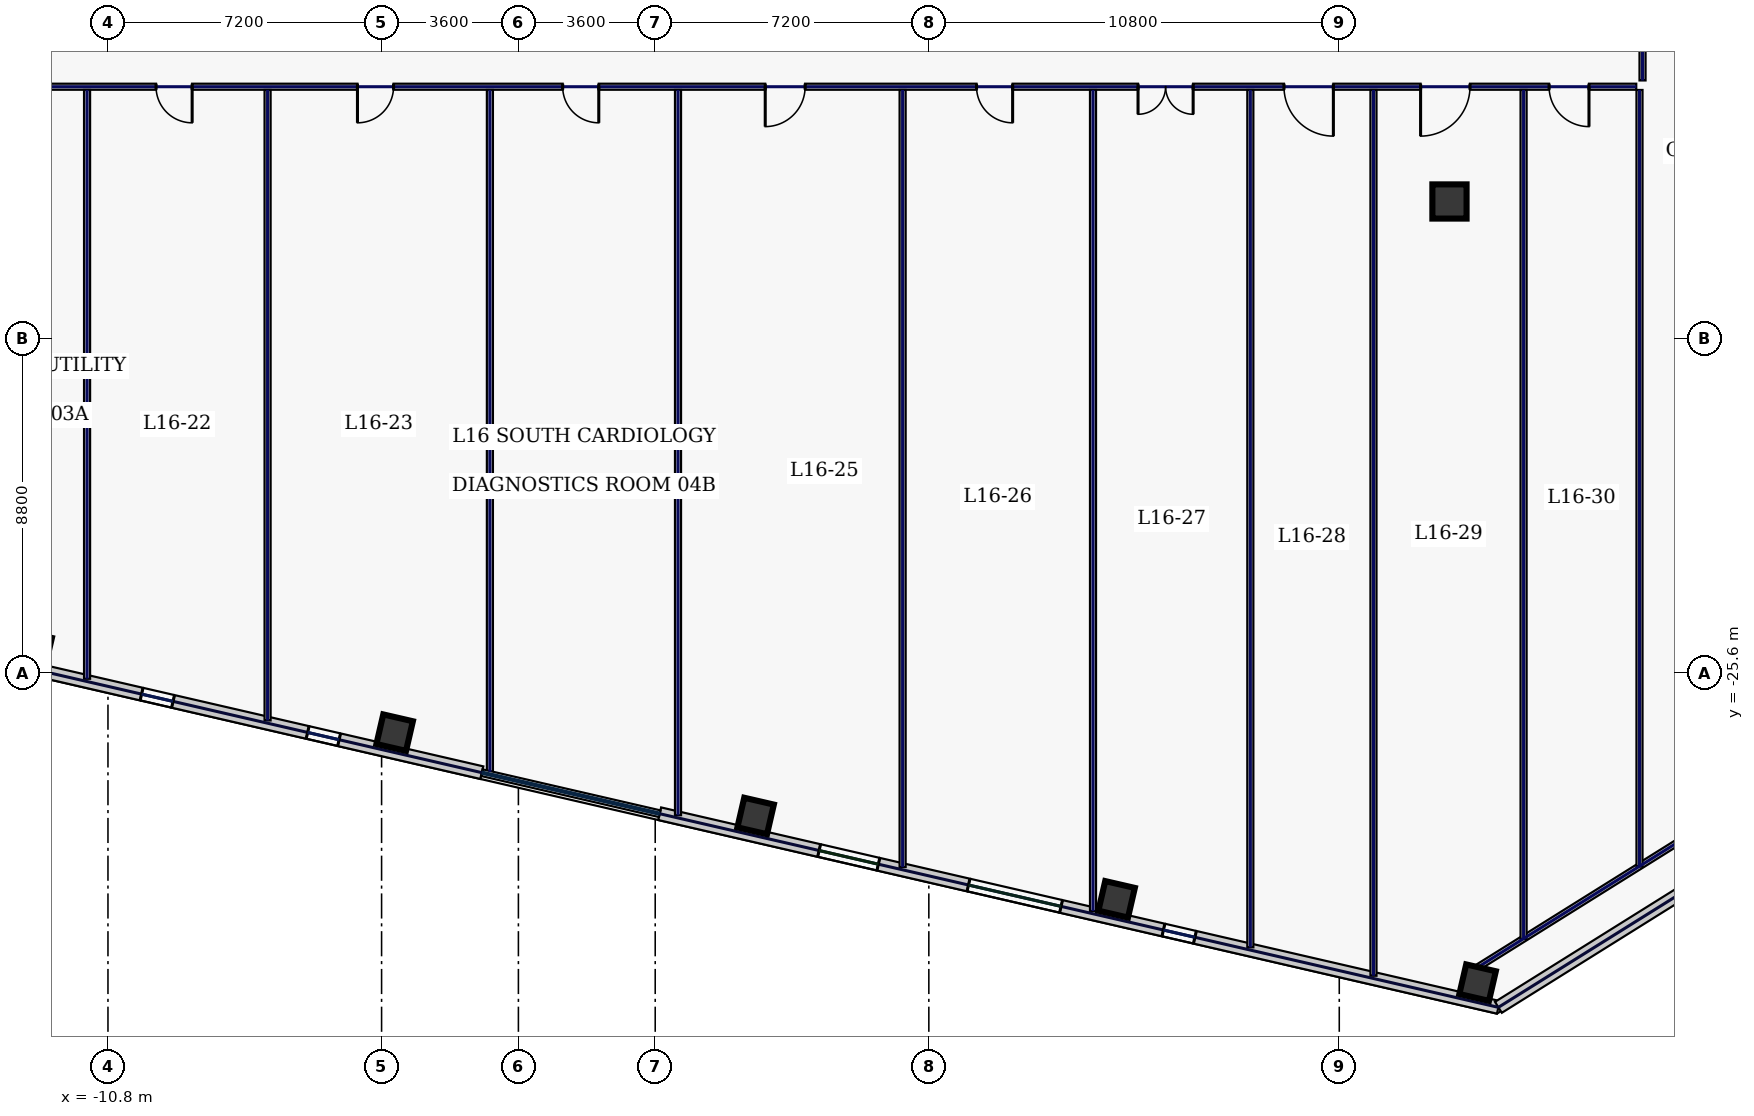
"""IFC4 building model, lengths in metres.
Left out: names, types, materials, properties, quantities, classifications, styles, units other than length and angle.
Written with IfcOpenShell. Run it as: python <this file> out.ifc"""

import sys

from ifc_helpers import new_model, si_unit, direction, frame, frame_2d, origin, origin_2d, place, context, subcontext, project, spatial, rectangle, hollow_rectangle, extrude, element, fill, save


model = new_model("IFC4")
c1 = context("Model", 3, precision=1e-05, world=origin(), true_north=direction((0.0, 1.0)))
c2 = subcontext(c1, "Body", "Model", "MODEL_VIEW")
j1 = project(units=[si_unit("LENGTHUNIT", "METRE"), si_unit("PLANEANGLEUNIT", "RADIAN")], contexts=[c1])
p1 = place(None, origin())
s1 = spatial("IfcSite", under=j1, at=p1, CompositionType="ELEMENT")
p2 = place(p1, origin())
s2 = spatial("IfcBuilding", under=s1, at=p2, CompositionType="ELEMENT")
p3 = place(p2, frame((0.0, 0.0, 75.4)))
s3 = spatial("IfcBuildingStorey", under=s2, at=p3, CompositionType="ELEMENT", Elevation=75.4)
p4 = place(p3, frame((24.5, -13.2, 0.0), z_axis=(0.0, 0.0, 1.0), x_axis=(1.0, 0.0, 0.0)))
e1 = element("IfcColumn", 1, at=p4, inside=s3, PredefinedType="COLUMN", context=c2, shape_type="SweptSolid", body=[
    extrude(hollow_rectangle(XDim=0.9, YDim=0.9, WallThickness=0.04, at=origin_2d()), origin(), (0.0, 0.0, 1.0), 3.74),
])
for number, where, z_axis, x_axis in (
    (2, (-3.256, -27.178, 0.0), (0.0, 0.0, 1.0), (0.974, -0.225, 0.0)),
    (3, (6.242, -29.371, 0.0), (0.0, 0.0, 1.0), (0.974, -0.225, 0.0)),
    (4, (15.741, -31.564, 0.0), (0.0, 0.0, 1.0), (0.974, -0.225, 0.0)),
    (5, (25.24, -33.757, 0.0), (0.0, 0.0, 1.0), (0.974, -0.225, 0.0)),
):
    element("IfcColumn", number, at=place(p3, frame(where, z_axis=z_axis, x_axis=x_axis)), inside=s3, PredefinedType="COLUMN", context=c2, shape_type="SweptSolid", body=[
        extrude(hollow_rectangle(XDim=0.8, YDim=0.8, WallThickness=0.036, at=origin_2d()), origin(), (0.0, 0.0, 1.0), 3.74),
    ])
p5 = place(p3, frame((-15.281, -24.925, 0.0), z_axis=(0.0, 0.0, 1.0), x_axis=(0.974370193991, -0.22495049469, 0.0)))
e6 = element("IfcWall", 6, at=p5, inside=s3, PredefinedType="STANDARD", context=c2, shape_type="SweptSolid", body=[
    extrude(rectangle(XDim=14.697, YDim=0.34, at=frame_2d((7.349, 0.0))), origin(), (0.0, 0.0, 1.0), 3.74),
])
p6 = place(p5, frame((5.506, 0.0, 0.72)))
e7 = element("IfcOpeningElement", 7, at=p6, cuts=e6, PredefinedType="OPENING", context=c2, shape_type="SweptSolid", body=[
    extrude(rectangle(XDim=0.85, YDim=1.85, at=frame_2d((0.425, 0.925))), frame((0.0, 0.18, 0.0), z_axis=(0.0, -1.0, 0.0), x_axis=(1.0, 0.0, 0.0)), (0.0, 0.0, 1.0), 0.36),
])
p7 = place(p5, frame((9.991, 0.0, 0.72)))
e8 = element("IfcOpeningElement", 8, at=p7, cuts=e6, PredefinedType="OPENING", context=c2, shape_type="SweptSolid", body=[
    extrude(rectangle(XDim=0.85, YDim=1.85, at=frame_2d((0.425, 0.925))), frame((0.0, 0.18, 0.0), z_axis=(0.0, -1.0, 0.0), x_axis=(1.0, 0.0, 0.0)), (0.0, 0.0, 1.0), 0.36),
])
p8 = place(p3, frame((3.717, -29.311, 0.0), z_axis=(0.0, 0.0, 1.0), x_axis=(0.97436993772, -0.224951604723, 0.0)))
e9 = element("IfcWall", 9, at=p8, inside=s3, PredefinedType="STANDARD", context=c2, shape_type="SweptSolid", body=[
    extrude(rectangle(XDim=22.651, YDim=0.34, at=frame_2d((11.326, 0.0))), origin(), (0.0, 0.0, 1.0), 3.74),
])
p9 = place(p8, frame((4.306, 0.0, 0.22)))
e10 = element("IfcOpeningElement", 10, at=p9, cuts=e9, PredefinedType="OPENING", context=c2, shape_type="SweptSolid", body=[
    extrude(rectangle(XDim=1.6, YDim=1.2, at=frame_2d((0.8, 0.6))), frame((0.0, 0.18, 0.0), z_axis=(0.0, -1.0, 0.0), x_axis=(1.0, 0.0, 0.0)), (0.0, 0.0, 1.0), 0.36),
])
p10 = place(p8, frame((8.341, 0.0, 0.72)))
e11 = element("IfcOpeningElement", 11, at=p10, cuts=e9, PredefinedType="OPENING", context=c2, shape_type="SweptSolid", body=[
    extrude(rectangle(XDim=2.5, YDim=2.15, at=frame_2d((1.25, 1.075))), frame((0.0, 0.18, 0.0), z_axis=(0.0, -1.0, 0.0), x_axis=(1.0, 0.0, 0.0)), (0.0, 0.0, 1.0), 0.36),
])
p11 = place(p8, frame((13.605, 0.0, 0.72)))
e12 = element("IfcOpeningElement", 12, at=p11, cuts=e9, PredefinedType="OPENING", context=c2, shape_type="SweptSolid", body=[
    extrude(rectangle(XDim=0.85, YDim=1.85, at=frame_2d((0.425, 0.925))), frame((0.0, 0.18, 0.0), z_axis=(0.0, -1.0, 0.0), x_axis=(1.0, 0.0, 0.0)), (0.0, 0.0, 1.0), 0.36),
])
p12 = place(p3, frame((25.788, -34.406, 0.0), z_axis=(0.0, 0.0, 1.0), x_axis=(0.848046504656, 0.529921811158, 0.0)))
e13 = element("IfcWall", 13, at=p12, inside=s3, PredefinedType="STANDARD", context=c2, shape_type="SweptSolid", body=[
    extrude(rectangle(XDim=7.113, YDim=0.34, at=frame_2d((3.557, 0.0))), origin(), (0.0, 0.0, 1.0), 3.74),
])
p13 = place(p3, frame((25.06, -33.468, 0.0), z_axis=(0.0, 0.0, 1.0), x_axis=(0.848043064089, 0.529927317139, 0.0)))
e14 = element("IfcWall", 14, at=p13, inside=s3, PredefinedType="PARTITIONING", context=c2, shape_type="SweptSolid", body=[
    extrude(rectangle(XDim=7.354, YDim=0.16, at=frame_2d((3.677, 0.0))), origin(), (0.0, 0.0, 1.0), 3.74),
])
p14 = place(p3, frame((29.58, 10.115, 0.0), z_axis=(0.0, 0.0, 1.0), x_axis=(0.0, -1.0, 0.0)))
e15 = element("IfcWall", 15, at=p14, inside=s3, PredefinedType="PARTITIONING", context=c2, shape_type="SweptSolid", body=[
    extrude(rectangle(XDim=20.13, YDim=0.16, at=frame_2d((10.065, 0.0))), origin(), (0.0, 0.0, 1.0), 3.74),
])
p15 = place(p14, frame((17.181, 0.0, 0.0)))
e16 = element("IfcOpeningElement", 16, at=p15, cuts=e15, PredefinedType="OPENING", context=c2, shape_type="SweptSolid", body=[
    extrude(rectangle(XDim=0.95, YDim=2.2, at=frame_2d((0.475, 1.1))), frame((0.0, 0.09, 0.0), z_axis=(0.0, -1.0, 0.0), x_axis=(1.0, 0.0, 0.0)), (0.0, 0.0, 1.0), 0.18),
])
p16 = place(p14, frame((12.95, 0.0, 0.0)))
e17 = element("IfcOpeningElement", 17, at=p16, cuts=e15, PredefinedType="OPENING", context=c2, shape_type="SweptSolid", body=[
    extrude(rectangle(XDim=0.95, YDim=2.2, at=frame_2d((0.475, 1.1))), frame((0.0, 0.09, 0.0), z_axis=(0.0, -1.0, 0.0), x_axis=(1.0, 0.0, 0.0)), (0.0, 0.0, 1.0), 0.18),
])
p17 = place(p14, frame((7.75, 0.0, 0.0)))
e18 = element("IfcOpeningElement", 18, at=p17, cuts=e15, PredefinedType="OPENING", context=c2, shape_type="SweptSolid", body=[
    extrude(rectangle(XDim=0.95, YDim=2.2, at=frame_2d((0.475, 1.1))), frame((0.0, 0.09, 0.0), z_axis=(0.0, -1.0, 0.0), x_axis=(1.0, 0.0, 0.0)), (0.0, 0.0, 1.0), 0.18),
])
p18 = place(p14, frame((2.219, 0.0, 0.0)))
e19 = element("IfcOpeningElement", 19, at=p18, cuts=e15, PredefinedType="OPENING", context=c2, shape_type="SweptSolid", body=[
    extrude(rectangle(XDim=0.95, YDim=2.2, at=frame_2d((0.475, 1.1))), frame((0.0, 0.09, 0.0), z_axis=(0.0, -1.0, 0.0), x_axis=(1.0, 0.0, 0.0)), (0.0, 0.0, 1.0), 0.18),
])
p19 = place(p3, frame((29.415, -10.18, 0.0), z_axis=(0.0, 0.0, 1.0), x_axis=(-1.0, 0.0, 0.0)))
e20 = element("IfcWall", 20, at=p19, inside=s3, PredefinedType="PARTITIONING", context=c2, shape_type="SweptSolid", body=[
    extrude(rectangle(XDim=58.83, YDim=0.16, at=frame_2d((29.415, 0.0))), origin(), (0.0, 0.0, 1.0), 3.74),
])
p20 = place(p19, frame((55.831, 0.0, 0.0)))
e21 = element("IfcOpeningElement", 21, at=p20, cuts=e20, PredefinedType="OPENING", context=c2, shape_type="SweptSolid", body=[
    extrude(rectangle(XDim=1.3, YDim=2.2, at=frame_2d((0.65, 1.1))), frame((0.0, 0.09, 0.0), z_axis=(0.0, -1.0, 0.0), x_axis=(1.0, 0.0, 0.0)), (0.0, 0.0, 1.0), 0.18),
])
p21 = place(p19, frame((49.775, 0.0, 0.0)))
e22 = element("IfcOpeningElement", 22, at=p21, cuts=e20, PredefinedType="OPENING", context=c2, shape_type="SweptSolid", body=[
    extrude(rectangle(XDim=1.3, YDim=2.2, at=frame_2d((0.65, 1.1))), frame((0.0, 0.09, 0.0), z_axis=(0.0, -1.0, 0.0), x_axis=(1.0, 0.0, 0.0)), (0.0, 0.0, 1.0), 0.18),
])
p22 = place(p19, frame((43.2, 0.0, 0.0)))
e23 = element("IfcOpeningElement", 23, at=p22, cuts=e20, PredefinedType="OPENING", context=c2, shape_type="SweptSolid", body=[
    extrude(rectangle(XDim=0.95, YDim=2.2, at=frame_2d((0.475, 1.1))), frame((0.0, 0.09, 0.0), z_axis=(0.0, -1.0, 0.0), x_axis=(1.0, 0.0, 0.0)), (0.0, 0.0, 1.0), 0.18),
])
p23 = place(p19, frame((38.0, 0.0, 0.0)))
e24 = element("IfcOpeningElement", 24, at=p23, cuts=e20, PredefinedType="OPENING", context=c2, shape_type="SweptSolid", body=[
    extrude(rectangle(XDim=0.95, YDim=2.2, at=frame_2d((0.475, 1.1))), frame((0.0, 0.09, 0.0), z_axis=(0.0, -1.0, 0.0), x_axis=(1.0, 0.0, 0.0)), (0.0, 0.0, 1.0), 0.18),
])
p24 = place(p19, frame((32.7, 0.0, 0.0)))
e25 = element("IfcOpeningElement", 25, at=p24, cuts=e20, PredefinedType="OPENING", context=c2, shape_type="SweptSolid", body=[
    extrude(rectangle(XDim=0.95, YDim=2.2, at=frame_2d((0.475, 1.1))), frame((0.0, 0.09, 0.0), z_axis=(0.0, -1.0, 0.0), x_axis=(1.0, 0.0, 0.0)), (0.0, 0.0, 1.0), 0.18),
])
p25 = place(p19, frame((27.3, 0.0, 0.0)))
e26 = element("IfcOpeningElement", 26, at=p25, cuts=e20, PredefinedType="OPENING", context=c2, shape_type="SweptSolid", body=[
    extrude(rectangle(XDim=0.95, YDim=2.2, at=frame_2d((0.475, 1.1))), frame((0.0, 0.09, 0.0), z_axis=(0.0, -1.0, 0.0), x_axis=(1.0, 0.0, 0.0)), (0.0, 0.0, 1.0), 0.18),
])
p26 = place(p19, frame((21.87, 0.0, 0.0)))
e27 = element("IfcOpeningElement", 27, at=p26, cuts=e20, PredefinedType="OPENING", context=c2, shape_type="SweptSolid", body=[
    extrude(rectangle(XDim=1.05, YDim=2.2, at=frame_2d((0.525, 1.1))), frame((0.0, 0.09, 0.0), z_axis=(0.0, -1.0, 0.0), x_axis=(1.0, 0.0, 0.0)), (0.0, 0.0, 1.0), 0.18),
])
p27 = place(p19, frame((16.41, 0.0, 0.0)))
e28 = element("IfcOpeningElement", 28, at=p27, cuts=e20, PredefinedType="OPENING", context=c2, shape_type="SweptSolid", body=[
    extrude(rectangle(XDim=0.95, YDim=2.2, at=frame_2d((0.475, 1.1))), frame((0.0, 0.09, 0.0), z_axis=(0.0, -1.0, 0.0), x_axis=(1.0, 0.0, 0.0)), (0.0, 0.0, 1.0), 0.18),
])
p28 = place(p19, frame((11.66, 0.0, 0.0)))
e29 = element("IfcOpeningElement", 29, at=p28, cuts=e20, PredefinedType="OPENING", context=c2, shape_type="SweptSolid", body=[
    extrude(rectangle(XDim=1.45, YDim=2.2, at=frame_2d((0.725, 1.1))), frame((0.0, 0.09, 0.0), z_axis=(0.0, -1.0, 0.0), x_axis=(1.0, 0.0, 0.0)), (0.0, 0.0, 1.0), 0.18),
])
p29 = place(p19, frame((7.97, 0.0, 0.0)))
e30 = element("IfcOpeningElement", 30, at=p29, cuts=e20, PredefinedType="OPENING", context=c2, shape_type="SweptSolid", body=[
    extrude(rectangle(XDim=1.3, YDim=2.2, at=frame_2d((0.65, 1.1))), frame((0.0, 0.09, 0.0), z_axis=(0.0, -1.0, 0.0), x_axis=(1.0, 0.0, 0.0)), (0.0, 0.0, 1.0), 0.18),
])
p30 = place(p19, frame((4.375, 0.0, 0.0)))
e31 = element("IfcOpeningElement", 31, at=p30, cuts=e20, PredefinedType="OPENING", context=c2, shape_type="SweptSolid", body=[
    extrude(rectangle(XDim=1.3, YDim=2.2, at=frame_2d((0.65, 1.1))), frame((0.0, 0.09, 0.0), z_axis=(0.0, -1.0, 0.0), x_axis=(1.0, 0.0, 0.0)), (0.0, 0.0, 1.0), 0.18),
])
p31 = place(p19, frame((1.244, 0.0, 0.0)))
e32 = element("IfcOpeningElement", 32, at=p31, cuts=e20, PredefinedType="OPENING", context=c2, shape_type="SweptSolid", body=[
    extrude(rectangle(XDim=1.05, YDim=2.2, at=frame_2d((0.525, 1.1))), frame((0.0, 0.09, 0.0), z_axis=(0.0, -1.0, 0.0), x_axis=(1.0, 0.0, 0.0)), (0.0, 0.0, 1.0), 0.18),
])
p32 = place(p3, frame((29.5, -30.703, 0.0), z_axis=(0.0, 0.0, 1.0), x_axis=(0.0, 1.0, 0.0)))
e33 = element("IfcWall", 33, at=p32, inside=s3, PredefinedType="PARTITIONING", context=c2, shape_type="SweptSolid", body=[
    extrude(rectangle(XDim=20.438, YDim=0.16, at=frame_2d((10.219, 0.0))), origin(), (0.0, 0.0, 1.0), 3.74),
])
p33 = place(p3, frame((-6.6, -26.857, 0.0), z_axis=(0.0, 0.0, 1.0), x_axis=(0.0, 1.0, 0.0)))
e34 = element("IfcWall", 34, at=p33, inside=s3, PredefinedType="PARTITIONING", context=c2, shape_type="SweptSolid", body=[
    extrude(rectangle(XDim=16.593, YDim=0.16, at=frame_2d((8.296, 0.0))), origin(), (0.0, 0.0, 1.0), 3.74),
])
p34 = place(p3, frame((4.2, -29.351, 0.0), z_axis=(0.0, 0.0, 1.0), x_axis=(0.0, 1.0, 0.0)))
e35 = element("IfcWall", 35, at=p34, inside=s3, PredefinedType="PARTITIONING", context=c2, shape_type="SweptSolid", body=[
    extrude(rectangle(XDim=19.086, YDim=0.16, at=frame_2d((9.543, 0.0))), origin(), (0.0, 0.0, 1.0), 3.74),
])
p35 = place(p3, frame((15.12, -31.872, 0.0), z_axis=(0.0, 0.0, 1.0), x_axis=(0.0, 1.0, 0.0)))
e36 = element("IfcWall", 36, at=p35, inside=s3, PredefinedType="PARTITIONING", context=c2, shape_type="SweptSolid", body=[
    extrude(rectangle(XDim=21.607, YDim=0.16, at=frame_2d((10.803, 0.0))), origin(), (0.0, 0.0, 1.0), 3.74),
])
p36 = place(p3, frame((22.5, -33.576, 0.0), z_axis=(0.0, 0.0, 1.0), x_axis=(0.0, 1.0, 0.0)))
e37 = element("IfcWall", 37, at=p36, inside=s3, PredefinedType="PARTITIONING", context=c2, shape_type="SweptSolid", body=[
    extrude(rectangle(XDim=23.311, YDim=0.16, at=frame_2d((11.655, 0.0))), origin(), (0.0, 0.0, 1.0), 3.74),
])
p37 = place(p3, frame((-11.35, -25.761, 0.0), z_axis=(0.0, 0.0, 1.0), x_axis=(0.0, 1.0, 0.0)))
e38 = element("IfcWall", 38, at=p37, inside=s3, PredefinedType="PARTITIONING", context=c2, shape_type="SweptSolid", body=[
    extrude(rectangle(XDim=15.496, YDim=0.16, at=frame_2d((7.748, 0.0))), origin(), (0.0, 0.0, 1.0), 3.74),
])
p38 = place(p3, frame((-0.75, -28.208, 0.0), z_axis=(0.0, 0.0, 1.0), x_axis=(0.0, 1.0, 0.0)))
e39 = element("IfcWall", 39, at=p38, inside=s3, PredefinedType="PARTITIONING", context=c2, shape_type="SweptSolid", body=[
    extrude(rectangle(XDim=17.943, YDim=0.16, at=frame_2d((8.972, 0.0))), origin(), (0.0, 0.0, 1.0), 3.74),
])
p39 = place(p3, frame((10.11, -30.715, 0.0), z_axis=(0.0, 0.0, 1.0), x_axis=(0.0, 1.0, 0.0)))
e40 = element("IfcWall", 40, at=p39, inside=s3, PredefinedType="PARTITIONING", context=c2, shape_type="SweptSolid", body=[
    extrude(rectangle(XDim=20.45, YDim=0.16, at=frame_2d((10.225, 0.0))), origin(), (0.0, 0.0, 1.0), 3.74),
])
p40 = place(p3, frame((19.26, -32.828, 0.0), z_axis=(0.0, 0.0, 1.0), x_axis=(0.0, 1.0, 0.0)))
e41 = element("IfcWall", 41, at=p40, inside=s3, PredefinedType="PARTITIONING", context=c2, shape_type="SweptSolid", body=[
    extrude(rectangle(XDim=22.563, YDim=0.16, at=frame_2d((11.281, 0.0))), origin(), (0.0, 0.0, 1.0), 3.74),
])
p41 = place(p3, frame((26.45, -32.609, 0.0), z_axis=(0.0, 0.0, 1.0), x_axis=(0.0, 1.0, 0.0)))
e42 = element("IfcWall", 42, at=p41, inside=s3, PredefinedType="PARTITIONING", context=c2, shape_type="SweptSolid", body=[
    extrude(rectangle(XDim=22.344, YDim=0.16, at=frame_2d((11.172, 0.0))), origin(), (0.0, 0.0, 1.0), 3.74),
])
p42 = place(p6, origin())
e43 = element("IfcWindow", 43, at=p42, inside=s3, PartitioningType="SINGLE_PANEL", PredefinedType="WINDOW", context=c2, shape_type="SweptSolid", body=[
    extrude(rectangle(XDim=0.85, YDim=1.85, at=frame_2d((0.425, 0.925))), frame((0.0, 0.03, 0.0), z_axis=(0.0, -1.0, 0.0), x_axis=(1.0, 0.0, 0.0)), (0.0, 0.0, 1.0), 0.06),
])
fill(e7, e43)
p43 = place(p7, origin())
e44 = element("IfcWindow", 44, at=p43, inside=s3, PartitioningType="SINGLE_PANEL", PredefinedType="WINDOW", context=c2, shape_type="SweptSolid", body=[
    extrude(rectangle(XDim=0.85, YDim=1.85, at=frame_2d((0.425, 0.925))), frame((0.0, 0.03, 0.0), z_axis=(0.0, -1.0, 0.0), x_axis=(1.0, 0.0, 0.0)), (0.0, 0.0, 1.0), 0.06),
])
fill(e8, e44)
p44 = place(p9, origin())
e45 = element("IfcWindow", 45, at=p44, inside=s3, PartitioningType="SINGLE_PANEL", PredefinedType="WINDOW", context=c2, shape_type="SweptSolid", body=[
    extrude(rectangle(XDim=1.6, YDim=1.2, at=frame_2d((0.8, 0.6))), frame((0.0, 0.03, 0.0), z_axis=(0.0, -1.0, 0.0), x_axis=(1.0, 0.0, 0.0)), (0.0, 0.0, 1.0), 0.06),
])
fill(e10, e45)
p45 = place(p10, origin())
e46 = element("IfcWindow", 46, at=p45, inside=s3, PartitioningType="SINGLE_PANEL", PredefinedType="WINDOW", context=c2, shape_type="SweptSolid", body=[
    extrude(rectangle(XDim=2.5, YDim=2.15, at=frame_2d((1.25, 1.075))), frame((0.0, 0.03, 0.0), z_axis=(0.0, -1.0, 0.0), x_axis=(1.0, 0.0, 0.0)), (0.0, 0.0, 1.0), 0.06),
])
fill(e11, e46)
p46 = place(p11, origin())
e47 = element("IfcWindow", 47, at=p46, inside=s3, PartitioningType="SINGLE_PANEL", PredefinedType="WINDOW", context=c2, shape_type="SweptSolid", body=[
    extrude(rectangle(XDim=0.85, YDim=1.85, at=frame_2d((0.425, 0.925))), frame((0.0, 0.03, 0.0), z_axis=(0.0, -1.0, 0.0), x_axis=(1.0, 0.0, 0.0)), (0.0, 0.0, 1.0), 0.06),
])
fill(e12, e47)
p47 = place(p23, origin())
e48 = element("IfcDoor", 48, at=p47, inside=s3, OperationType="SINGLE_SWING_LEFT", PredefinedType="DOOR", context=c2, shape_type="SweptSolid", body=[
    extrude(rectangle(XDim=0.95, YDim=2.2, at=frame_2d((0.475, 1.1))), frame((0.0, 0.025, 0.0), z_axis=(0.0, -1.0, 0.0), x_axis=(1.0, 0.0, 0.0)), (0.0, 0.0, 1.0), 0.05),
])
fill(e24, e48)
p48 = place(p24, origin())
e49 = element("IfcDoor", 49, at=p48, inside=s3, OperationType="SINGLE_SWING_RIGHT", PredefinedType="DOOR", context=c2, shape_type="SweptSolid", body=[
    extrude(rectangle(XDim=0.95, YDim=2.2, at=frame_2d((0.475, 1.1))), frame((0.0, 0.025, 0.0), z_axis=(0.0, -1.0, 0.0), x_axis=(1.0, 0.0, 0.0)), (0.0, 0.0, 1.0), 0.05),
])
fill(e25, e49)
p49 = place(p25, origin())
e50 = element("IfcDoor", 50, at=p49, inside=s3, OperationType="SINGLE_SWING_LEFT", PredefinedType="DOOR", context=c2, shape_type="SweptSolid", body=[
    extrude(rectangle(XDim=0.95, YDim=2.2, at=frame_2d((0.475, 1.1))), frame((0.0, 0.025, 0.0), z_axis=(0.0, -1.0, 0.0), x_axis=(1.0, 0.0, 0.0)), (0.0, 0.0, 1.0), 0.05),
])
fill(e26, e50)
p50 = place(p26, origin())
e51 = element("IfcDoor", 51, at=p50, inside=s3, OperationType="SINGLE_SWING_RIGHT", PredefinedType="DOOR", context=c2, shape_type="SweptSolid", body=[
    extrude(rectangle(XDim=1.05, YDim=2.2, at=frame_2d((0.525, 1.1))), frame((0.0, 0.025, 0.0), z_axis=(0.0, -1.0, 0.0), x_axis=(1.0, 0.0, 0.0)), (0.0, 0.0, 1.0), 0.05),
])
fill(e27, e51)
p51 = place(p27, origin())
e52 = element("IfcDoor", 52, at=p51, inside=s3, OperationType="SINGLE_SWING_LEFT", PredefinedType="DOOR", context=c2, shape_type="SweptSolid", body=[
    extrude(rectangle(XDim=0.95, YDim=2.2, at=frame_2d((0.475, 1.1))), frame((0.0, 0.025, 0.0), z_axis=(0.0, -1.0, 0.0), x_axis=(1.0, 0.0, 0.0)), (0.0, 0.0, 1.0), 0.05),
])
fill(e28, e52)
p52 = place(p28, origin())
e53 = element("IfcDoor", 53, at=p52, inside=s3, OperationType="DOUBLE_SWING_LEFT", PredefinedType="DOOR", context=c2, shape_type="SweptSolid", body=[
    extrude(rectangle(XDim=1.45, YDim=2.2, at=frame_2d((0.725, 1.1))), frame((0.0, 0.025, 0.0), z_axis=(0.0, -1.0, 0.0), x_axis=(1.0, 0.0, 0.0)), (0.0, 0.0, 1.0), 0.05),
])
fill(e29, e53)
p53 = place(p29, origin())
e54 = element("IfcDoor", 54, at=p53, inside=s3, OperationType="SINGLE_SWING_LEFT", PredefinedType="DOOR", context=c2, shape_type="SweptSolid", body=[
    extrude(rectangle(XDim=1.3, YDim=2.2, at=frame_2d((0.65, 1.1))), frame((0.0, 0.025, 0.0), z_axis=(0.0, -1.0, 0.0), x_axis=(1.0, 0.0, 0.0)), (0.0, 0.0, 1.0), 0.05),
])
fill(e30, e54)
p54 = place(p30, origin())
e55 = element("IfcDoor", 55, at=p54, inside=s3, OperationType="SINGLE_SWING_RIGHT", PredefinedType="DOOR", context=c2, shape_type="SweptSolid", body=[
    extrude(rectangle(XDim=1.3, YDim=2.2, at=frame_2d((0.65, 1.1))), frame((0.0, 0.025, 0.0), z_axis=(0.0, -1.0, 0.0), x_axis=(1.0, 0.0, 0.0)), (0.0, 0.0, 1.0), 0.05),
])
fill(e31, e55)
p55 = place(p31, origin())
e56 = element("IfcDoor", 56, at=p55, inside=s3, OperationType="SINGLE_SWING_LEFT", PredefinedType="DOOR", context=c2, shape_type="SweptSolid", body=[
    extrude(rectangle(XDim=1.05, YDim=2.2, at=frame_2d((0.525, 1.1))), frame((0.0, 0.025, 0.0), z_axis=(0.0, -1.0, 0.0), x_axis=(1.0, 0.0, 0.0)), (0.0, 0.0, 1.0), 0.05),
])
fill(e32, e56)
save(model, sys.argv[1])
